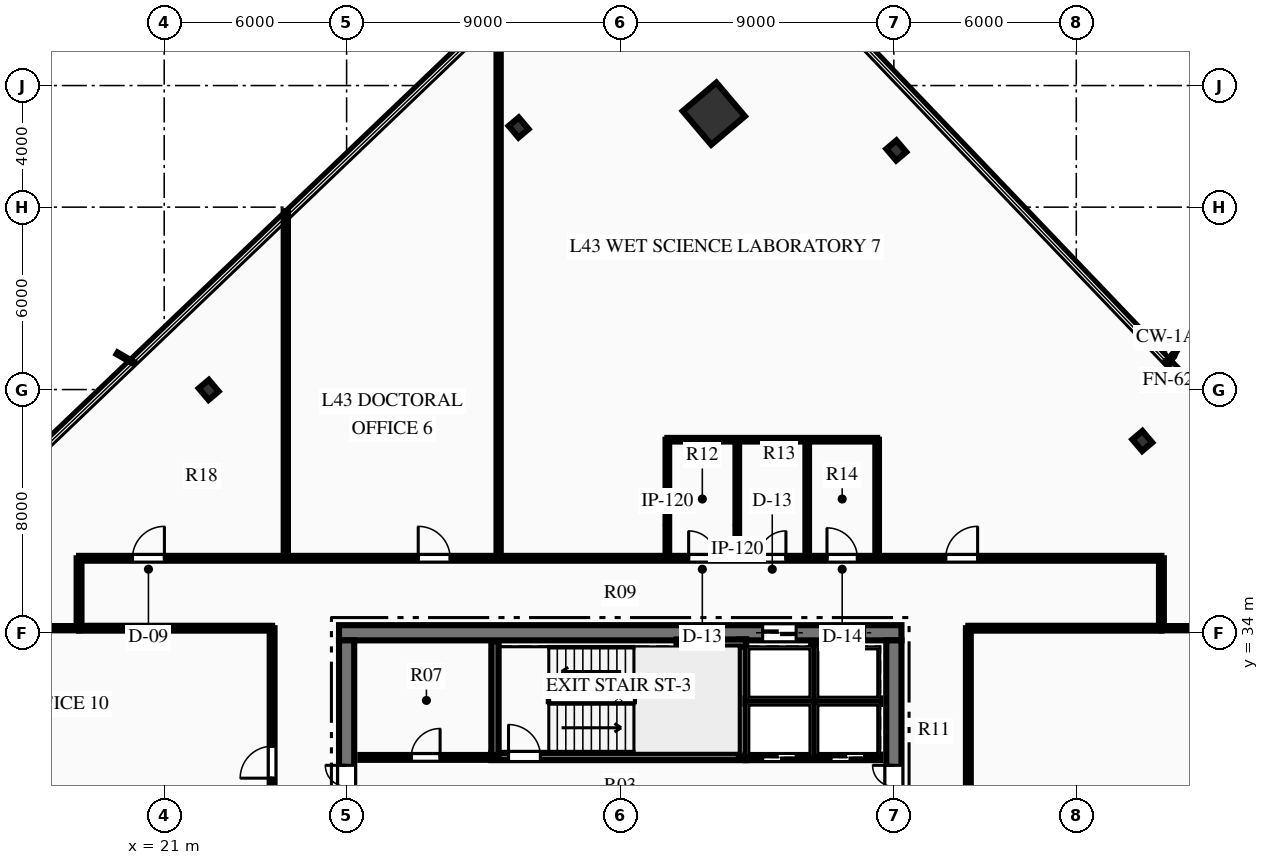
"""IFC4 building model, lengths in metres.
Left out: names, types, materials, properties, quantities, classifications, styles, units other than length and angle.
Written with IfcOpenShell. Run it as: python <this file> out.ifc"""

import sys

from ifc_helpers import new_model, si_unit, direction, frame, frame_2d, origin, origin_2d, place, context, subcontext, project, spatial, rectangle, hollow_rectangle, i_section, extrude, element, fill, save


model = new_model("IFC4")
c1 = context("Model", 3, precision=1e-05, world=origin(), true_north=direction((0.0, 1.0)))
c2 = subcontext(c1, "Body", "Model", "MODEL_VIEW")
j1 = project(units=[si_unit("LENGTHUNIT", "METRE"), si_unit("PLANEANGLEUNIT", "RADIAN")], contexts=[c1])
p1 = place(None, origin())
s1 = spatial("IfcSite", under=j1, at=p1, CompositionType="ELEMENT")
p2 = place(p1, origin())
s2 = spatial("IfcBuilding", under=s1, at=p2, CompositionType="ELEMENT")
p3 = place(p2, frame((0.0, 0.0, 174.45)))
s3 = spatial("IfcBuildingStorey", under=s2, at=p3, CompositionType="ELEMENT", Elevation=174.45)
p4 = place(p3, frame((26.75, 34.0, 0.0), z_axis=(0.0, 0.0, 1.0), x_axis=(1.0, 0.0, 0.0)))
e1 = element("IfcWall", 1, at=p4, inside=s3, PredefinedType="SHEAR", context=c2, shape_type="SweptSolid", body=[
    extrude(rectangle(XDim=18.5, YDim=0.5, at=frame_2d((9.25, 0.0))), origin(), (0.0, 0.0, 1.0), 3.75),
])
p5 = place(p4, frame((13.935, 0.0, 0.0)))
e2 = element("IfcOpeningElement", 2, at=p5, cuts=e1, PredefinedType="OPENING", context=c2, shape_type="SweptSolid", body=[
    extrude(rectangle(XDim=1.1, YDim=2.15, at=frame_2d((0.55, 1.075))), frame((0.0, 0.26, 0.0), z_axis=(0.0, -1.0, 0.0), x_axis=(1.0, 0.0, 0.0)), (0.0, 0.0, 1.0), 0.52),
])
p6 = place(p4, frame((16.185, 0.0, 0.0)))
e3 = element("IfcOpeningElement", 3, at=p6, cuts=e1, PredefinedType="OPENING", context=c2, shape_type="SweptSolid", body=[
    extrude(rectangle(XDim=1.1, YDim=2.15, at=frame_2d((0.55, 1.075))), frame((0.0, 0.26, 0.0), z_axis=(0.0, -1.0, 0.0), x_axis=(1.0, 0.0, 0.0)), (0.0, 0.0, 1.0), 0.52),
])
p7 = place(p3, frame((27.0, 18.25, 0.0), z_axis=(0.0, 0.0, 1.0), x_axis=(0.0, 1.0, 0.0)))
e4 = element("IfcWall", 4, at=p7, inside=s3, PredefinedType="SHEAR", context=c2, shape_type="SweptSolid", body=[
    extrude(rectangle(XDim=15.5, YDim=0.5, at=frame_2d((7.75, 0.0))), origin(), (0.0, 0.0, 1.0), 3.75),
])
p8 = place(p7, frame((9.99, 0.0, 0.0)))
e5 = element("IfcOpeningElement", 5, at=p8, cuts=e4, PredefinedType="OPENING", context=c2, shape_type="SweptSolid", body=[
    extrude(rectangle(XDim=1.4, YDim=2.2, at=frame_2d((0.7, 1.1))), frame((0.0, 0.26, 0.0), z_axis=(0.0, -1.0, 0.0), x_axis=(1.0, 0.0, 0.0)), (0.0, 0.0, 1.0), 0.52),
])
p9 = place(p3, frame((45.0, 18.25, 0.0), z_axis=(0.0, 0.0, 1.0), x_axis=(0.0, 1.0, 0.0)))
e6 = element("IfcWall", 6, at=p9, inside=s3, PredefinedType="SHEAR", context=c2, shape_type="SweptSolid", body=[
    extrude(rectangle(XDim=15.5, YDim=0.5, at=frame_2d((7.75, 0.0))), origin(), (0.0, 0.0, 1.0), 3.75),
])
p10 = place(p9, frame((9.99, 0.0, 0.0)))
e7 = element("IfcOpeningElement", 7, at=p10, cuts=e6, PredefinedType="OPENING", context=c2, shape_type="SweptSolid", body=[
    extrude(rectangle(XDim=1.4, YDim=2.2, at=frame_2d((0.7, 1.1))), frame((0.0, 0.26, 0.0), z_axis=(0.0, -1.0, 0.0), x_axis=(1.0, 0.0, 0.0)), (0.0, 0.0, 1.0), 0.52),
])
p11 = place(p3, frame((31.76, 29.93, 0.0), z_axis=(0.0, 0.0, 1.0), x_axis=(1.0, 0.0, 0.0)))
e8 = element("IfcWall", 8, at=p11, inside=s3, PredefinedType="SHEAR", context=c2, shape_type="SweptSolid", body=[
    extrude(rectangle(XDim=8.38, YDim=0.24, at=frame_2d((4.19, 0.0))), origin(), (0.0, 0.0, 1.0), 3.75),
])
p12 = place(p11, frame((0.565, 0.0, 0.0)))
e9 = element("IfcOpeningElement", 9, at=p12, cuts=e8, PredefinedType="OPENING", context=c2, shape_type="SweptSolid", body=[
    extrude(rectangle(XDim=1.05, YDim=2.15, at=frame_2d((0.525, 1.075))), frame((0.0, 0.13, 0.0), z_axis=(0.0, -1.0, 0.0), x_axis=(1.0, 0.0, 0.0)), (0.0, 0.0, 1.0), 0.26),
])
p13 = place(p3, frame((31.88, 29.93, 0.0), z_axis=(0.0, 0.0, 1.0), x_axis=(0.0, 1.0, 0.0)))
e10 = element("IfcWall", 10, at=p13, inside=s3, PredefinedType="SHEAR", context=c2, shape_type="SweptSolid", body=[
    extrude(rectangle(XDim=3.79, YDim=0.24, at=frame_2d((1.895, 0.0))), origin(), (0.0, 0.0, 1.0), 3.75),
])
p14 = place(p3, frame((40.02, 29.93, 0.0), z_axis=(0.0, 0.0, 1.0), x_axis=(0.0, 1.0, 0.0)))
e11 = element("IfcWall", 11, at=p14, inside=s3, PredefinedType="SHEAR", context=c2, shape_type="SweptSolid", body=[
    extrude(rectangle(XDim=3.85, YDim=0.24, at=frame_2d((1.925, 0.0))), origin(), (0.0, 0.0, 1.0), 3.75),
])
p15 = place(p3, frame((37.85, 33.66, 0.0), z_axis=(0.0, 0.0, 1.0), x_axis=(1.0, 0.0, 0.0)))
e12 = element("IfcWall", 12, at=p15, inside=s3, PredefinedType="SHEAR", context=c2, shape_type="SweptSolid", body=[
    extrude(rectangle(XDim=2.29, YDim=0.24, at=frame_2d((1.145, 0.0))), origin(), (0.0, 0.0, 1.0), 3.75),
])
p16 = place(p3, frame((39.077, 51.075, 0.0), z_axis=(0.0, 0.0, 1.0), x_axis=(0.763232469783, 0.646123979643, 0.0)))
e13 = element("IfcColumn", 13, at=p16, inside=s3, PredefinedType="COLUMN", context=c2, shape_type="SweptSolid", body=[
    extrude(hollow_rectangle(XDim=1.45, YDim=1.45, WallThickness=0.07, at=origin_2d()), origin(), (0.0, 0.0, 1.0), 3.75),
])
for number, where, z_axis, x_axis in (
    (14, (53.171, 40.307, 0.0), (0.0, 0.0, 1.0), (0.763, 0.646, 0.0)),
    (15, (45.08, 49.865, 0.0), (0.0, 0.0, 1.0), (0.763, 0.646, 0.0)),
    (16, (32.657, 50.619, 0.0), (0.0, 0.0, 1.0), (0.763, 0.646, 0.0)),
    (17, (22.464, 41.99, 0.0), (0.0, 0.0, 1.0), (0.763, 0.646, 0.0)),
):
    element("IfcColumn", number, at=place(p3, frame(where, z_axis=z_axis, x_axis=x_axis)), inside=s3, PredefinedType="COLUMN", context=c2, shape_type="SweptSolid", body=[
        extrude(i_section(OverallWidth=0.432, OverallDepth=0.498, WebThickness=0.056, FlangeThickness=0.089, at=origin_2d()), origin(), (0.0, 0.0, 1.0), 3.75),
    ])
p17 = place(p3, frame((27.45, 29.9, 0.0), z_axis=(0.0, 0.0, 1.0), x_axis=(1.0, 0.0, 0.0)))
e18 = element("IfcWall", 18, at=p17, inside=s3, PredefinedType="PARTITIONING", context=c2, shape_type="SweptSolid", body=[
    extrude(rectangle(XDim=4.43, YDim=0.16, at=frame_2d((2.215, 0.0))), origin(), (0.0, 0.0, 1.0), 3.46),
])
p18 = place(p17, frame((1.675, 0.0, 0.0)))
e19 = element("IfcOpeningElement", 19, at=p18, cuts=e18, PredefinedType="OPENING", context=c2, shape_type="SweptSolid", body=[
    extrude(rectangle(XDim=0.95, YDim=2.15, at=frame_2d((0.475, 1.075))), frame((0.0, 0.09, 0.0), z_axis=(0.0, -1.0, 0.0), x_axis=(1.0, 0.0, 0.0)), (0.0, 0.0, 1.0), 0.18),
])
p19 = place(p3, frame((40.12, 29.9, 0.0), z_axis=(0.0, 0.0, 1.0), x_axis=(1.0, 0.0, 0.0)))
e20 = element("IfcWall", 20, at=p19, inside=s3, PredefinedType="PARTITIONING", context=c2, shape_type="SweptSolid", body=[
    extrude(rectangle(XDim=4.43, YDim=0.18, at=frame_2d((2.215, 0.0))), origin(), (0.0, 0.0, 1.0), 3.46),
])
p20 = place(p19, frame((0.565, 0.0, 0.0)))
e21 = element("IfcOpeningElement", 21, at=p20, cuts=e20, PredefinedType="OPENING", context=c2, shape_type="SweptSolid", body=[
    extrude(rectangle(XDim=1.1, YDim=2.15, at=frame_2d((0.55, 1.075))), frame((0.0, 0.1, 0.0), z_axis=(0.0, -1.0, 0.0), x_axis=(1.0, 0.0, 0.0)), (0.0, 0.0, 1.0), 0.2),
])
p21 = place(p19, frame((2.815, 0.0, 0.0)))
e22 = element("IfcOpeningElement", 22, at=p21, cuts=e20, PredefinedType="OPENING", context=c2, shape_type="SweptSolid", body=[
    extrude(rectangle(XDim=1.1, YDim=2.15, at=frame_2d((0.55, 1.075))), frame((0.0, 0.1, 0.0), z_axis=(0.0, -1.0, 0.0), x_axis=(1.0, 0.0, 0.0)), (0.0, 0.0, 1.0), 0.2),
])
p22 = place(p3, frame((40.12, 31.75, 0.0), z_axis=(0.0, 0.0, 1.0), x_axis=(1.0, 0.0, 0.0)))
e23 = element("IfcWall", 23, at=p22, inside=s3, PredefinedType="PARTITIONING", context=c2, shape_type="SweptSolid", body=[
    extrude(rectangle(XDim=4.43, YDim=0.18, at=frame_2d((2.215, 0.0))), origin(), (0.0, 0.0, 1.0), 3.46),
])
p23 = place(p3, frame((42.37, 29.9, 0.0), z_axis=(0.0, 0.0, 1.0), x_axis=(0.0, 1.0, 0.0)))
e24 = element("IfcWall", 24, at=p23, inside=s3, PredefinedType="PARTITIONING", context=c2, shape_type="SweptSolid", body=[
    extrude(rectangle(XDim=3.75, YDim=0.18, at=frame_2d((1.875, 0.0))), origin(), (0.0, 0.0, 1.0), 3.46),
])
p24 = place(p3, frame((18.2, 36.45, 0.0), z_axis=(0.0, 0.0, 1.0), x_axis=(1.0, 0.0, 0.0)))
e25 = element("IfcWall", 25, at=p24, inside=s3, PredefinedType="PARTITIONING", context=c2, shape_type="SweptSolid", body=[
    extrude(rectangle(XDim=35.6, YDim=0.16, at=frame_2d((17.8, 0.0))), origin(), (0.0, 0.0, 1.0), 3.46),
])
p25 = place(p24, frame((20.05, 0.0, 0.0)))
e26 = element("IfcOpeningElement", 26, at=p25, cuts=e25, PredefinedType="OPENING", context=c2, shape_type="SweptSolid", body=[
    extrude(rectangle(XDim=0.9, YDim=2.15, at=frame_2d((0.45, 1.075))), frame((0.0, 0.09, 0.0), z_axis=(0.0, -1.0, 0.0), x_axis=(1.0, 0.0, 0.0)), (0.0, 0.0, 1.0), 0.18),
])
p26 = place(p24, frame((22.35, 0.0, 0.0)))
e27 = element("IfcOpeningElement", 27, at=p26, cuts=e25, PredefinedType="OPENING", context=c2, shape_type="SweptSolid", body=[
    extrude(rectangle(XDim=0.9, YDim=2.15, at=frame_2d((0.45, 1.075))), frame((0.0, 0.09, 0.0), z_axis=(0.0, -1.0, 0.0), x_axis=(1.0, 0.0, 0.0)), (0.0, 0.0, 1.0), 0.18),
])
p27 = place(p24, frame((24.6, 0.0, 0.0)))
e28 = element("IfcOpeningElement", 28, at=p27, cuts=e25, PredefinedType="OPENING", context=c2, shape_type="SweptSolid", body=[
    extrude(rectangle(XDim=1.0, YDim=2.15, at=frame_2d((0.5, 1.075))), frame((0.0, 0.09, 0.0), z_axis=(0.0, -1.0, 0.0), x_axis=(1.0, 0.0, 0.0)), (0.0, 0.0, 1.0), 0.18),
])
p28 = place(p24, frame((1.757, 0.0, 0.0)))
e29 = element("IfcOpeningElement", 29, at=p28, cuts=e25, PredefinedType="OPENING", context=c2, shape_type="SweptSolid", body=[
    extrude(rectangle(XDim=1.05, YDim=2.15, at=frame_2d((0.525, 1.075))), frame((0.0, 0.09, 0.0), z_axis=(0.0, -1.0, 0.0), x_axis=(1.0, 0.0, 0.0)), (0.0, 0.0, 1.0), 0.18),
])
p29 = place(p24, frame((11.155, 0.0, 0.0)))
e30 = element("IfcOpeningElement", 30, at=p29, cuts=e25, PredefinedType="OPENING", context=c2, shape_type="SweptSolid", body=[
    extrude(rectangle(XDim=1.05, YDim=2.15, at=frame_2d((0.525, 1.075))), frame((0.0, 0.09, 0.0), z_axis=(0.0, -1.0, 0.0), x_axis=(1.0, 0.0, 0.0)), (0.0, 0.0, 1.0), 0.18),
])
p30 = place(p24, frame((28.505, 0.0, 0.0)))
e31 = element("IfcOpeningElement", 31, at=p30, cuts=e25, PredefinedType="OPENING", context=c2, shape_type="SweptSolid", body=[
    extrude(rectangle(XDim=1.05, YDim=2.15, at=frame_2d((0.525, 1.075))), frame((0.0, 0.09, 0.0), z_axis=(0.0, -1.0, 0.0), x_axis=(1.0, 0.0, 0.0)), (0.0, 0.0, 1.0), 0.18),
])
for number, where, z_axis, x_axis in (
    (32, (18.2, 34.15, 0.0), (0.0, 0.0, 1.0), (1.0, 0.0, 0.0)),
    (33, (47.45, 34.15, 0.0), (0.0, 0.0, 1.0), (1.0, 0.0, 0.0)),
):
    element("IfcWall", number, at=place(p3, frame(where, z_axis=z_axis, x_axis=x_axis)), inside=s3, PredefinedType="PARTITIONING", context=c2, shape_type="SweptSolid", body=[
        extrude(rectangle(XDim=6.35, YDim=0.16, at=frame_2d((3.175, 0.0))), origin(), (0.0, 0.0, 1.0), 3.46),
    ])
p31 = place(p3, frame((24.55, 17.85, 0.0), z_axis=(0.0, 0.0, 1.0), x_axis=(0.0, 1.0, 0.0)))
e34 = element("IfcWall", 34, at=p31, inside=s3, PredefinedType="PARTITIONING", context=c2, shape_type="SweptSolid", body=[
    extrude(rectangle(XDim=16.3, YDim=0.16, at=frame_2d((8.15, 0.0))), origin(), (0.0, 0.0, 1.0), 3.46),
])
p32 = place(p31, frame((6.625, 0.0, 0.0)))
e35 = element("IfcOpeningElement", 35, at=p32, cuts=e34, PredefinedType="OPENING", context=c2, shape_type="SweptSolid", body=[
    extrude(rectangle(XDim=1.05, YDim=2.15, at=frame_2d((0.525, 1.075))), frame((0.0, 0.09, 0.0), z_axis=(0.0, -1.0, 0.0), x_axis=(1.0, 0.0, 0.0)), (0.0, 0.0, 1.0), 0.18),
])
p33 = place(p31, frame((11.367, 0.0, 0.0)))
e36 = element("IfcOpeningElement", 36, at=p33, cuts=e34, PredefinedType="OPENING", context=c2, shape_type="SweptSolid", body=[
    extrude(rectangle(XDim=1.05, YDim=2.15, at=frame_2d((0.525, 1.075))), frame((0.0, 0.09, 0.0), z_axis=(0.0, -1.0, 0.0), x_axis=(1.0, 0.0, 0.0)), (0.0, 0.0, 1.0), 0.18),
])
p34 = place(p3, frame((47.45, 27.25, 0.0), z_axis=(0.0, 0.0, 1.0), x_axis=(0.0, 1.0, 0.0)))
e37 = element("IfcWall", 37, at=p34, inside=s3, PredefinedType="PARTITIONING", context=c2, shape_type="SweptSolid", body=[
    extrude(rectangle(XDim=6.9, YDim=0.16, at=frame_2d((3.45, 0.0))), origin(), (0.0, 0.0, 1.0), 3.46),
])
for number, where, z_axis, x_axis in (
    (38, (18.2, 34.15, 0.0), (0.0, 0.0, 1.0), (0.0, 1.0, 0.0)),
    (39, (53.8, 34.15, 0.0), (0.0, 0.0, 1.0), (0.0, 1.0, 0.0)),
):
    element("IfcWall", number, at=place(p3, frame(where, z_axis=z_axis, x_axis=x_axis)), inside=s3, PredefinedType="PARTITIONING", context=c2, shape_type="SweptSolid", body=[
        extrude(rectangle(XDim=2.3, YDim=0.16, at=frame_2d((1.15, 0.0))), origin(), (0.0, 0.0, 1.0), 3.46),
    ])
for number, where, z_axis, x_axis in (
    (40, (37.55, 36.45, 0.0), (0.0, 0.0, 1.0), (0.0, 1.0, 0.0)),
    (41, (39.85, 36.45, 0.0), (0.0, 0.0, 1.0), (0.0, 1.0, 0.0)),
    (42, (42.15, 36.45, 0.0), (0.0, 0.0, 1.0), (0.0, 1.0, 0.0)),
    (43, (44.45, 36.45, 0.0), (0.0, 0.0, 1.0), (0.0, 1.0, 0.0)),
):
    element("IfcWall", number, at=place(p3, frame(where, z_axis=z_axis, x_axis=x_axis)), inside=s3, PredefinedType="PARTITIONING", context=c2, shape_type="SweptSolid", body=[
        extrude(rectangle(XDim=3.9, YDim=0.12, at=frame_2d((1.95, 0.0))), origin(), (0.0, 0.0, 1.0), 3.46),
    ])
p35 = place(p3, frame((37.55, 40.35, 0.0), z_axis=(0.0, 0.0, 1.0), x_axis=(1.0, 0.0, 0.0)))
e44 = element("IfcWall", 44, at=p35, inside=s3, PredefinedType="PARTITIONING", context=c2, shape_type="SweptSolid", body=[
    extrude(rectangle(XDim=6.9, YDim=0.12, at=frame_2d((3.45, 0.0))), origin(), (0.0, 0.0, 1.0), 3.46),
])
p36 = place(p3, frame((10.644, 34.15, 0.0), z_axis=(0.0, 0.0, 1.0), x_axis=(1.0, 0.0, 0.0)))
e45 = element("IfcWall", 45, at=p36, inside=s3, PredefinedType="PARTITIONING", context=c2, shape_type="SweptSolid", body=[
    extrude(rectangle(XDim=7.556, YDim=0.14, at=frame_2d((3.778, 0.0))), origin(), (0.0, 0.0, 1.0), 3.46),
])
p37 = place(p3, frame((53.8, 34.15, 0.0), z_axis=(0.0, 0.0, 1.0), x_axis=(1.0, 0.0, 0.0)))
e46 = element("IfcWall", 46, at=p37, inside=s3, PredefinedType="PARTITIONING", context=c2, shape_type="SweptSolid", body=[
    extrude(rectangle(XDim=8.729, YDim=0.14, at=frame_2d((4.364, 0.0))), origin(), (0.0, 0.0, 1.0), 3.46),
])
p38 = place(p3, frame((25.0, 36.45, 0.0), z_axis=(0.0, 0.0, 1.0), x_axis=(0.0, 1.0, 0.0)))
e47 = element("IfcWall", 47, at=p38, inside=s3, PredefinedType="PARTITIONING", context=c2, shape_type="SweptSolid", body=[
    extrude(rectangle(XDim=11.419, YDim=0.14, at=frame_2d((5.709, 0.0))), origin(), (0.0, 0.0, 1.0), 3.46),
])
p39 = place(p3, frame((32.0, 36.45, 0.0), z_axis=(0.0, 0.0, 1.0), x_axis=(0.0, 1.0, 0.0)))
e48 = element("IfcWall", 48, at=p39, inside=s3, PredefinedType="PARTITIONING", context=c2, shape_type="SweptSolid", body=[
    extrude(rectangle(XDim=18.108, YDim=0.14, at=frame_2d((9.054, 0.0))), origin(), (0.0, 0.0, 1.0), 3.46),
])
p40 = place(p18, origin())
e49 = element("IfcDoor", 49, at=p40, inside=s3, OperationType="SINGLE_SWING_RIGHT", PredefinedType="DOOR", context=c2, shape_type="SweptSolid", body=[
    extrude(rectangle(XDim=0.95, YDim=2.15, at=frame_2d((0.475, 1.075))), frame((0.0, 0.025, 0.0), z_axis=(0.0, -1.0, 0.0), x_axis=(1.0, 0.0, 0.0)), (0.0, 0.0, 1.0), 0.05),
])
fill(e19, e49)
p41 = place(p12, origin())
e50 = element("IfcDoor", 50, at=p41, inside=s3, OperationType="SINGLE_SWING_LEFT", PredefinedType="DOOR", context=c2, shape_type="SweptSolid", body=[
    extrude(rectangle(XDim=1.05, YDim=2.15, at=frame_2d((0.525, 1.075))), frame((0.0, 0.025, 0.0), z_axis=(0.0, -1.0, 0.0), x_axis=(1.0, 0.0, 0.0)), (0.0, 0.0, 1.0), 0.05),
])
fill(e9, e50)
p42 = place(p8, origin())
e51 = element("IfcDoor", 51, at=p42, inside=s3, OperationType="DOUBLE_DOOR_SINGLE_SWING", PredefinedType="DOOR", context=c2, shape_type="SweptSolid", body=[
    extrude(rectangle(XDim=1.4, YDim=2.2, at=frame_2d((0.7, 1.1))), frame((0.0, 0.025, 0.0), z_axis=(0.0, -1.0, 0.0), x_axis=(1.0, 0.0, 0.0)), (0.0, 0.0, 1.0), 0.05),
])
fill(e5, e51)
p43 = place(p10, origin())
e52 = element("IfcDoor", 52, at=p43, inside=s3, OperationType="DOUBLE_DOOR_SINGLE_SWING", PredefinedType="DOOR", context=c2, shape_type="SweptSolid", body=[
    extrude(rectangle(XDim=1.4, YDim=2.2, at=frame_2d((0.7, 1.1))), frame((0.0, 0.025, 0.0), z_axis=(0.0, -1.0, 0.0), x_axis=(1.0, 0.0, 0.0)), (0.0, 0.0, 1.0), 0.05),
])
fill(e7, e52)
p44 = place(p25, origin())
e53 = element("IfcDoor", 53, at=p44, inside=s3, OperationType="SINGLE_SWING_LEFT", PredefinedType="DOOR", context=c2, shape_type="SweptSolid", body=[
    extrude(rectangle(XDim=0.9, YDim=2.15, at=frame_2d((0.45, 1.075))), frame((0.0, 0.025, 0.0), z_axis=(0.0, -1.0, 0.0), x_axis=(1.0, 0.0, 0.0)), (0.0, 0.0, 1.0), 0.05),
])
fill(e26, e53)
p45 = place(p26, origin())
e54 = element("IfcDoor", 54, at=p45, inside=s3, OperationType="SINGLE_SWING_RIGHT", PredefinedType="DOOR", context=c2, shape_type="SweptSolid", body=[
    extrude(rectangle(XDim=0.9, YDim=2.15, at=frame_2d((0.45, 1.075))), frame((0.0, 0.025, 0.0), z_axis=(0.0, -1.0, 0.0), x_axis=(1.0, 0.0, 0.0)), (0.0, 0.0, 1.0), 0.05),
])
fill(e27, e54)
p46 = place(p27, origin())
e55 = element("IfcDoor", 55, at=p46, inside=s3, OperationType="SINGLE_SWING_LEFT", PredefinedType="DOOR", context=c2, shape_type="SweptSolid", body=[
    extrude(rectangle(XDim=1.0, YDim=2.15, at=frame_2d((0.5, 1.075))), frame((0.0, 0.025, 0.0), z_axis=(0.0, -1.0, 0.0), x_axis=(1.0, 0.0, 0.0)), (0.0, 0.0, 1.0), 0.05),
])
fill(e28, e55)
p47 = place(p28, origin())
e56 = element("IfcDoor", 56, at=p47, inside=s3, OperationType="SINGLE_SWING_RIGHT", PredefinedType="DOOR", context=c2, shape_type="SweptSolid", body=[
    extrude(rectangle(XDim=1.05, YDim=2.15, at=frame_2d((0.525, 1.075))), frame((0.0, 0.025, 0.0), z_axis=(0.0, -1.0, 0.0), x_axis=(1.0, 0.0, 0.0)), (0.0, 0.0, 1.0), 0.05),
])
fill(e29, e56)
p48 = place(p29, origin())
e57 = element("IfcDoor", 57, at=p48, inside=s3, OperationType="SINGLE_SWING_LEFT", PredefinedType="DOOR", context=c2, shape_type="SweptSolid", body=[
    extrude(rectangle(XDim=1.05, YDim=2.15, at=frame_2d((0.525, 1.075))), frame((0.0, 0.025, 0.0), z_axis=(0.0, -1.0, 0.0), x_axis=(1.0, 0.0, 0.0)), (0.0, 0.0, 1.0), 0.05),
])
fill(e30, e57)
p49 = place(p30, origin())
e58 = element("IfcDoor", 58, at=p49, inside=s3, OperationType="SINGLE_SWING_RIGHT", PredefinedType="DOOR", context=c2, shape_type="SweptSolid", body=[
    extrude(rectangle(XDim=1.05, YDim=2.15, at=frame_2d((0.525, 1.075))), frame((0.0, 0.025, 0.0), z_axis=(0.0, -1.0, 0.0), x_axis=(1.0, 0.0, 0.0)), (0.0, 0.0, 1.0), 0.05),
])
fill(e31, e58)
p50 = place(p33, origin())
e59 = element("IfcDoor", 59, at=p50, inside=s3, OperationType="SINGLE_SWING_LEFT", PredefinedType="DOOR", context=c2, shape_type="SweptSolid", body=[
    extrude(rectangle(XDim=1.05, YDim=2.15, at=frame_2d((0.525, 1.075))), frame((0.0, 0.025, 0.0), z_axis=(0.0, -1.0, 0.0), x_axis=(1.0, 0.0, 0.0)), (0.0, 0.0, 1.0), 0.05),
])
fill(e36, e59)
p51 = place(p20, origin())
e60 = element("IfcDoor", 60, at=p51, inside=s3, OperationType="SLIDING_TO_LEFT", PredefinedType="DOOR", context=c2, shape_type="SweptSolid", body=[
    extrude(rectangle(XDim=1.1, YDim=2.15, at=frame_2d((0.55, 1.075))), frame((0.0, 0.025, 0.0), z_axis=(0.0, -1.0, 0.0), x_axis=(1.0, 0.0, 0.0)), (0.0, 0.0, 1.0), 0.05),
])
fill(e21, e60)
p52 = place(p21, origin())
e61 = element("IfcDoor", 61, at=p52, inside=s3, OperationType="SLIDING_TO_LEFT", PredefinedType="DOOR", context=c2, shape_type="SweptSolid", body=[
    extrude(rectangle(XDim=1.1, YDim=2.15, at=frame_2d((0.55, 1.075))), frame((0.0, 0.025, 0.0), z_axis=(0.0, -1.0, 0.0), x_axis=(1.0, 0.0, 0.0)), (0.0, 0.0, 1.0), 0.05),
])
fill(e22, e61)
p53 = place(p5, origin())
e62 = element("IfcDoor", 62, at=p53, inside=s3, OperationType="SLIDING_TO_LEFT", PredefinedType="DOOR", context=c2, shape_type="SweptSolid", body=[
    extrude(rectangle(XDim=1.1, YDim=2.15, at=frame_2d((0.55, 1.075))), frame((0.0, 0.025, 0.0), z_axis=(0.0, -1.0, 0.0), x_axis=(1.0, 0.0, 0.0)), (0.0, 0.0, 1.0), 0.05),
])
fill(e2, e62)
p54 = place(p6, origin())
e63 = element("IfcDoor", 63, at=p54, inside=s3, OperationType="SLIDING_TO_LEFT", PredefinedType="DOOR", context=c2, shape_type="SweptSolid", body=[
    extrude(rectangle(XDim=1.1, YDim=2.15, at=frame_2d((0.55, 1.075))), frame((0.0, 0.025, 0.0), z_axis=(0.0, -1.0, 0.0), x_axis=(1.0, 0.0, 0.0)), (0.0, 0.0, 1.0), 0.05),
])
fill(e3, e63)
save(model, sys.argv[1])
